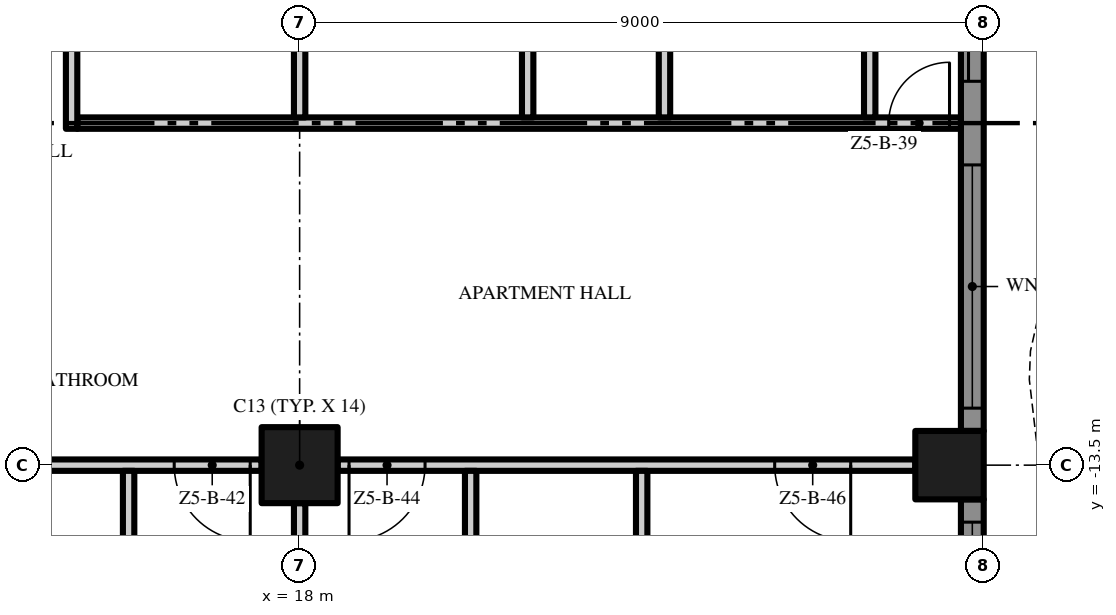
"""IFC4 building model, lengths in metres.
Left out: names, types, materials, properties, quantities, classifications, styles, units other than length and angle.
Written with IfcOpenShell. Run it as: python <this file> out.ifc"""

import sys

from ifc_helpers import new_model, si_unit, direction, frame, frame_2d, origin, origin_2d, place, context, subcontext, project, spatial, polyline, rectangle, outline, extrude, element, fill, save


model = new_model("IFC4")
c1 = context("Model", 3, precision=1e-05, world=origin(), true_north=direction((0.0, 1.0)))
c2 = subcontext(c1, "Body", "Model", "MODEL_VIEW")
j1 = project(units=[si_unit("LENGTHUNIT", "METRE"), si_unit("PLANEANGLEUNIT", "RADIAN")], contexts=[c1])
p1 = place(None, origin())
s1 = spatial("IfcSite", under=j1, at=p1, CompositionType="ELEMENT")
p2 = place(p1, origin())
s2 = spatial("IfcBuilding", under=s1, at=p2, CompositionType="ELEMENT")
p3 = place(p2, frame((0.0, 0.0, 254.0)))
s3 = spatial("IfcBuildingStorey", under=s2, at=p3, CompositionType="ELEMENT", Elevation=254.0)
p4 = place(p3, frame((18.0, -13.5, 0.0), z_axis=(0.0, 0.0, 1.0), x_axis=(1.0, 0.0, 0.0)))
e1 = element("IfcColumn", 1, at=p4, inside=s3, PredefinedType="COLUMN", context=c2, shape_type="SweptSolid", body=[
    extrude(rectangle(XDim=1.0, YDim=1.0, at=origin_2d()), origin(), (0.0, 0.0, 1.0), 3.5),
])
p5 = place(p3, frame((26.55, -13.5, 0.0), z_axis=(0.0, 0.0, 1.0), x_axis=(1.0, 0.0, 0.0)))
e2 = element("IfcColumn", 2, at=p5, inside=s3, PredefinedType="COLUMN", context=c2, shape_type="SweptSolid", body=[
    extrude(rectangle(XDim=0.9, YDim=0.9, at=origin_2d()), origin(), (0.0, 0.0, 1.0), 3.5),
])
p6 = place(p3, frame((26.85, -13.95, 0.0), z_axis=(0.0, 0.0, 1.0), x_axis=(0.0, -1.0, 0.0)))
e3 = element("IfcWall", 3, at=p6, inside=s3, PredefinedType="SOLIDWALL", context=c2, shape_type="SweptSolid", body=[
    extrude(rectangle(XDim=3.75, YDim=0.3, at=frame_2d((1.875, 0.0))), origin(), (0.0, 0.0, 1.0), 3.5),
])
p7 = place(p6, frame((0.3, 0.0, 0.45)))
e4 = element("IfcOpeningElement", 4, at=p7, cuts=e3, PredefinedType="OPENING", context=c2, shape_type="SweptSolid", body=[
    extrude(rectangle(XDim=3.15, YDim=2.65, at=frame_2d((1.575, 1.325))), frame((0.0, 0.16, 0.0), z_axis=(0.0, -1.0, 0.0), x_axis=(1.0, 0.0, 0.0)), (0.0, 0.0, 1.0), 0.32),
])
p8 = place(p3, frame((26.85, -4.95, 0.0), z_axis=(0.0, 0.0, 1.0), x_axis=(0.0, -1.0, 0.0)))
e5 = element("IfcWall", 5, at=p8, inside=s3, PredefinedType="SOLIDWALL", context=c2, shape_type="SweptSolid", body=[
    extrude(rectangle(XDim=8.1, YDim=0.3, at=frame_2d((4.05, 0.0))), origin(), (0.0, 0.0, 1.0), 3.5),
])
p9 = place(p8, frame((4.6, 0.0, 0.45)))
e6 = element("IfcOpeningElement", 6, at=p9, cuts=e5, PredefinedType="OPENING", context=c2, shape_type="SweptSolid", body=[
    extrude(rectangle(XDim=3.2, YDim=2.65, at=frame_2d((1.6, 1.325))), frame((0.0, 0.16, 0.0), z_axis=(0.0, -1.0, 0.0), x_axis=(1.0, 0.0, 0.0)), (0.0, 0.0, 1.0), 0.32),
])
p10 = place(p8, frame((0.3, 0.0, 0.0)))
e7 = element("IfcOpeningElement", 7, at=p10, cuts=e5, PredefinedType="OPENING", context=c2, shape_type="SweptSolid", body=[
    extrude(rectangle(XDim=3.2, YDim=2.4, at=frame_2d((1.6, 1.2))), frame((0.0, 0.16, 0.0), z_axis=(0.0, -1.0, 0.0), x_axis=(1.0, 0.0, 0.0)), (0.0, 0.0, 1.0), 0.32),
])
p11 = place(p3, origin())
e8 = element("IfcWall", 8, at=p11, inside=s3, PredefinedType="USERDEFINED", context=c2, shape_type="SweptSolid", body=[
    extrude(outline(polyline([(29.649, -18.0), (28.988, -16.5), (28.255, -15.0), (27.731, -13.5), (27.6, -12.375), (27.615, -12.0), (27.951, -10.5), (28.612, -9.0), (29.345, -7.5), (29.869, -6.0), (30.0, -4.875), (29.985, -4.5), (29.649, -3.0), (28.988, -1.5), (28.255, 0.0), (27.731, 1.5), (27.6, 2.625), (27.615, 3.0), (27.951, 4.5), (28.612, 6.0), (29.345, 7.5), (29.869, 9.0), (30.0, 10.125), (29.985, 10.5), (29.649, 12.0), (28.988, 13.5), (28.255, 15.0), (27.731, 16.5), (27.6, 17.625), (27.615, 18.0), (27.365, 18.01), (27.349, 17.615), (27.486, 16.444), (28.024, 14.904), (28.761, 13.395), (29.41, 11.921), (29.736, 10.467), (29.749, 10.135), (29.624, 9.056), (29.114, 7.596), (28.385, 6.105), (27.713, 4.579), (27.366, 3.033), (27.349, 2.615), (27.486, 1.444), (28.024, -0.096), (28.761, -1.605), (29.41, -3.079), (29.736, -4.533), (29.749, -4.865), (29.624, -5.944), (29.114, -7.404), (28.385, -8.895), (27.713, -10.421), (27.366, -11.967), (27.349, -12.385), (27.486, -13.556), (28.024, -15.096), (28.761, -16.605), (29.42, -18.101), (29.649, -18.0)])), origin(), (0.0, 0.0, 1.0), 0.9),
])
p12 = place(p3, frame((17.5, -13.5, 0.0), z_axis=(0.0, 0.0, 1.0), x_axis=(-1.0, 0.0, 0.0)))
e9 = element("IfcWall", 9, at=p12, inside=s3, PredefinedType="PARTITIONING", context=c2, shape_type="SweptSolid", body=[
    extrude(rectangle(XDim=8.0, YDim=0.15, at=frame_2d((4.0, 0.0))), origin(), (0.0, 0.0, 1.0), 3.5),
])
p13 = place(p12, frame((6.05, 0.0, 0.0)))
e10 = element("IfcOpeningElement", 10, at=p13, cuts=e9, PredefinedType="OPENING", context=c2, shape_type="SweptSolid", body=[
    extrude(rectangle(XDim=1.8, YDim=2.4, at=frame_2d((0.9, 1.2))), frame((0.0, 0.085, 0.0), z_axis=(0.0, -1.0, 0.0), x_axis=(1.0, 0.0, 0.0)), (0.0, 0.0, 1.0), 0.17),
])
p14 = place(p12, frame((0.15, 0.0, 0.0)))
e11 = element("IfcOpeningElement", 11, at=p14, cuts=e9, PredefinedType="OPENING", context=c2, shape_type="SweptSolid", body=[
    extrude(rectangle(XDim=1.0, YDim=2.4, at=frame_2d((0.5, 1.2))), frame((0.0, 0.085, 0.0), z_axis=(0.0, -1.0, 0.0), x_axis=(1.0, 0.0, 0.0)), (0.0, 0.0, 1.0), 0.17),
])
p15 = place(p3, frame((26.1, -13.5, 0.0), z_axis=(0.0, 0.0, 1.0), x_axis=(-1.0, 0.0, 0.0)))
e12 = element("IfcWall", 12, at=p15, inside=s3, PredefinedType="PARTITIONING", context=c2, shape_type="SweptSolid", body=[
    extrude(rectangle(XDim=7.6, YDim=0.15, at=frame_2d((3.8, 0.0))), origin(), (0.0, 0.0, 1.0), 3.5),
])
p16 = place(p15, frame((6.45, 0.0, 0.0)))
e13 = element("IfcOpeningElement", 13, at=p16, cuts=e12, PredefinedType="OPENING", context=c2, shape_type="SweptSolid", body=[
    extrude(rectangle(XDim=1.0, YDim=2.4, at=frame_2d((0.5, 1.2))), frame((0.0, 0.085, 0.0), z_axis=(0.0, -1.0, 0.0), x_axis=(1.0, 0.0, 0.0)), (0.0, 0.0, 1.0), 0.17),
])
p17 = place(p15, frame((0.85, 0.0, 0.0)))
e14 = element("IfcOpeningElement", 14, at=p17, cuts=e12, PredefinedType="OPENING", context=c2, shape_type="SweptSolid", body=[
    extrude(rectangle(XDim=1.0, YDim=2.4, at=frame_2d((0.5, 1.2))), frame((0.0, 0.085, 0.0), z_axis=(0.0, -1.0, 0.0), x_axis=(1.0, 0.0, 0.0)), (0.0, 0.0, 1.0), 0.17),
])
p18 = place(p3, frame((15.075, -9.0, 0.0), z_axis=(0.0, 0.0, 1.0), x_axis=(1.0, 0.0, 0.0)))
e15 = element("IfcWall", 15, at=p18, inside=s3, PredefinedType="PARTITIONING", context=c2, shape_type="SweptSolid", body=[
    extrude(rectangle(XDim=11.625, YDim=0.15, at=frame_2d((5.812, 0.0))), origin(), (0.0, 0.0, 1.0), 3.5),
])
p19 = place(p18, frame((10.675, 0.0, 0.0)))
e16 = element("IfcOpeningElement", 16, at=p19, cuts=e15, PredefinedType="OPENING", context=c2, shape_type="SweptSolid", body=[
    extrude(rectangle(XDim=0.8, YDim=2.0, at=frame_2d((0.4, 1.0))), frame((0.0, 0.085, 0.0), z_axis=(0.0, -1.0, 0.0), x_axis=(1.0, 0.0, 0.0)), (0.0, 0.0, 1.0), 0.17),
])
p20 = place(p3, frame((15.0, -9.075, 0.0), z_axis=(0.0, 0.0, 1.0), x_axis=(0.0, 1.0, 0.0)))
e17 = element("IfcWall", 17, at=p20, inside=s3, PredefinedType="PARTITIONING", context=c2, shape_type="SweptSolid", body=[
    extrude(rectangle(XDim=4.65, YDim=0.15, at=frame_2d((2.325, 0.0))), origin(), (0.0, 0.0, 1.0), 3.5),
])
p21 = place(p3, frame((15.75, -16.575, 0.0), z_axis=(0.0, 0.0, 1.0), x_axis=(0.0, 1.0, 0.0)))
e18 = element("IfcWall", 18, at=p21, inside=s3, PredefinedType="PARTITIONING", context=c2, shape_type="SweptSolid", body=[
    extrude(rectangle(XDim=3.0, YDim=0.15, at=frame_2d((1.5, 0.0))), origin(), (0.0, 0.0, 1.0), 3.5),
])
p22 = place(p3, frame((18.0, -21.6, 0.0), z_axis=(0.0, 0.0, 1.0), x_axis=(0.0, 1.0, 0.0)))
e19 = element("IfcWall", 19, at=p22, inside=s3, PredefinedType="PARTITIONING", context=c2, shape_type="SweptSolid", body=[
    extrude(rectangle(XDim=7.6, YDim=0.15, at=frame_2d((3.8, 0.0))), origin(), (0.0, 0.0, 1.0), 3.5),
])
p23 = place(p3, frame((18.0, -8.925, 0.0), z_axis=(0.0, 0.0, 1.0), x_axis=(0.0, 1.0, 0.0)))
e20 = element("IfcWall", 20, at=p23, inside=s3, PredefinedType="PARTITIONING", context=c2, shape_type="SweptSolid", body=[
    extrude(rectangle(XDim=3.925, YDim=0.15, at=frame_2d((1.962, 0.0))), origin(), (0.0, 0.0, 1.0), 3.5),
])
p24 = place(p3, frame((20.25, -16.575, 0.0), z_axis=(0.0, 0.0, 1.0), x_axis=(0.0, 1.0, 0.0)))
e21 = element("IfcWall", 21, at=p24, inside=s3, PredefinedType="PARTITIONING", context=c2, shape_type="SweptSolid", body=[
    extrude(rectangle(XDim=3.0, YDim=0.15, at=frame_2d((1.5, 0.0))), origin(), (0.0, 0.0, 1.0), 3.5),
])
p25 = place(p3, frame((21.0, -8.925, 0.0), z_axis=(0.0, 0.0, 1.0), x_axis=(0.0, 1.0, 0.0)))
e22 = element("IfcWall", 22, at=p25, inside=s3, PredefinedType="PARTITIONING", context=c2, shape_type="SweptSolid", body=[
    extrude(rectangle(XDim=4.35, YDim=0.15, at=frame_2d((2.175, 0.0))), origin(), (0.0, 0.0, 1.0), 3.5),
])
p26 = place(p3, frame((22.5, -17.55, 0.0), z_axis=(0.0, 0.0, 1.0), x_axis=(0.0, 1.0, 0.0)))
e23 = element("IfcWall", 23, at=p26, inside=s3, PredefinedType="PARTITIONING", context=c2, shape_type="SweptSolid", body=[
    extrude(rectangle(XDim=3.975, YDim=0.15, at=frame_2d((1.988, 0.0))), origin(), (0.0, 0.0, 1.0), 3.5),
])
for number, where, z_axis, x_axis in (
    (24, (22.8, -8.925, 0.0), (0.0, 0.0, 1.0), (0.0, 1.0, 0.0)),
    (25, (25.5, -8.925, 0.0), (0.0, 0.0, 1.0), (0.0, 1.0, 0.0)),
):
    element("IfcWall", number, at=place(p3, frame(where, z_axis=z_axis, x_axis=x_axis)), inside=s3, PredefinedType="PARTITIONING", context=c2, shape_type="SweptSolid", body=[
        extrude(rectangle(XDim=4.35, YDim=0.15, at=frame_2d((2.175, 0.0))), origin(), (0.0, 0.0, 1.0), 3.5),
    ])
p27 = place(p7, origin())
e26 = element("IfcWindow", 26, at=p27, inside=s3, PartitioningType="SINGLE_PANEL", PredefinedType="WINDOW", context=c2, shape_type="SweptSolid", body=[
    extrude(rectangle(XDim=3.15, YDim=2.65, at=frame_2d((1.575, 1.325))), frame((0.0, 0.03, 0.0), z_axis=(0.0, -1.0, 0.0), x_axis=(1.0, 0.0, 0.0)), (0.0, 0.0, 1.0), 0.06),
])
fill(e4, e26)
p28 = place(p9, origin())
e27 = element("IfcWindow", 27, at=p28, inside=s3, PartitioningType="SINGLE_PANEL", PredefinedType="WINDOW", context=c2, shape_type="SweptSolid", body=[
    extrude(rectangle(XDim=3.2, YDim=2.65, at=frame_2d((1.6, 1.325))), frame((0.0, 0.03, 0.0), z_axis=(0.0, -1.0, 0.0), x_axis=(1.0, 0.0, 0.0)), (0.0, 0.0, 1.0), 0.06),
])
fill(e6, e27)
p29 = place(p10, origin())
e28 = element("IfcDoor", 28, at=p29, inside=s3, OperationType="SINGLE_SWING_LEFT", PredefinedType="DOOR", context=c2, shape_type="SweptSolid", body=[
    extrude(rectangle(XDim=3.2, YDim=2.4, at=frame_2d((1.6, 1.2))), frame((0.0, 0.025, 0.0), z_axis=(0.0, -1.0, 0.0), x_axis=(1.0, 0.0, 0.0)), (0.0, 0.0, 1.0), 0.05),
])
fill(e7, e28)
p30 = place(p19, origin())
e29 = element("IfcDoor", 29, at=p30, inside=s3, OperationType="SINGLE_SWING_RIGHT", PredefinedType="DOOR", context=c2, shape_type="SweptSolid", body=[
    extrude(rectangle(XDim=0.8, YDim=2.0, at=frame_2d((0.4, 1.0))), frame((0.0, 0.025, 0.0), z_axis=(0.0, -1.0, 0.0), x_axis=(1.0, 0.0, 0.0)), (0.0, 0.0, 1.0), 0.05),
])
fill(e16, e29)
p31 = place(p14, origin())
e30 = element("IfcDoor", 30, at=p31, inside=s3, OperationType="SINGLE_SWING_LEFT", PredefinedType="DOOR", context=c2, shape_type="SweptSolid", body=[
    extrude(rectangle(XDim=1.0, YDim=2.4, at=frame_2d((0.5, 1.2))), frame((0.0, 0.025, 0.0), z_axis=(0.0, -1.0, 0.0), x_axis=(1.0, 0.0, 0.0)), (0.0, 0.0, 1.0), 0.05),
])
fill(e11, e30)
p32 = place(p16, origin())
e31 = element("IfcDoor", 31, at=p32, inside=s3, OperationType="SINGLE_SWING_RIGHT", PredefinedType="DOOR", context=c2, shape_type="SweptSolid", body=[
    extrude(rectangle(XDim=1.0, YDim=2.4, at=frame_2d((0.5, 1.2))), frame((0.0, 0.025, 0.0), z_axis=(0.0, -1.0, 0.0), x_axis=(1.0, 0.0, 0.0)), (0.0, 0.0, 1.0), 0.05),
])
fill(e13, e31)
p33 = place(p17, origin())
e32 = element("IfcDoor", 32, at=p33, inside=s3, OperationType="SINGLE_SWING_LEFT", PredefinedType="DOOR", context=c2, shape_type="SweptSolid", body=[
    extrude(rectangle(XDim=1.0, YDim=2.4, at=frame_2d((0.5, 1.2))), frame((0.0, 0.025, 0.0), z_axis=(0.0, -1.0, 0.0), x_axis=(1.0, 0.0, 0.0)), (0.0, 0.0, 1.0), 0.05),
])
fill(e14, e32)
save(model, sys.argv[1])
